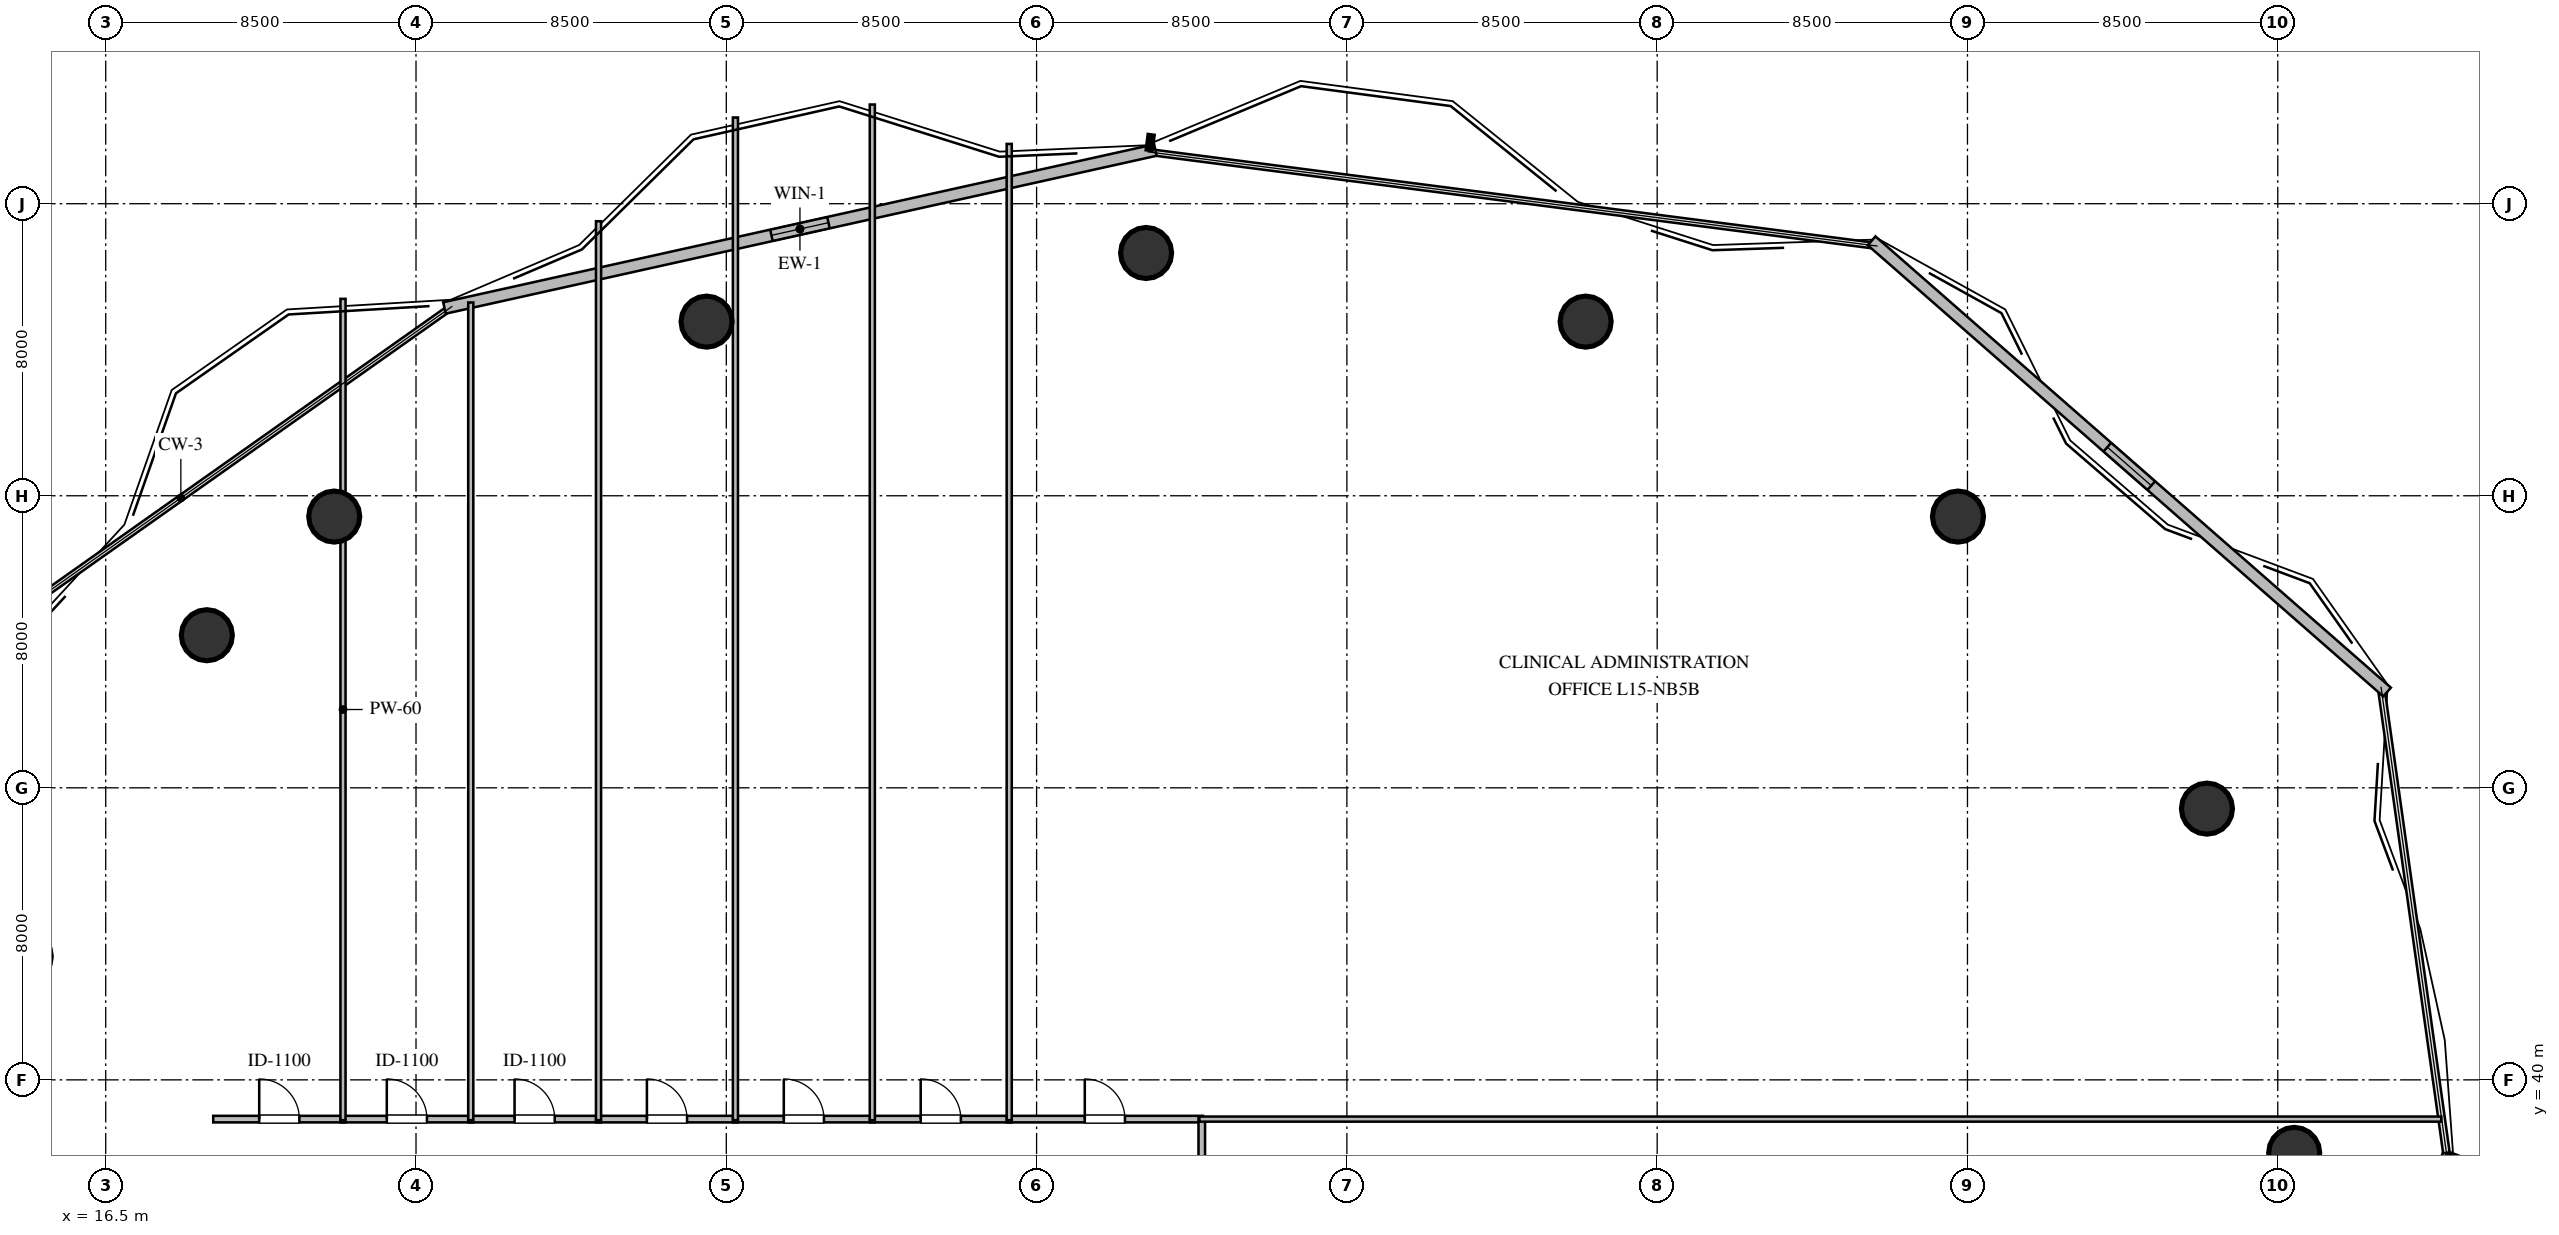
"""IFC4 building model, lengths in metres.
Left out: names, types, materials, properties, quantities, classifications, styles, units other than length and angle.
Written with IfcOpenShell. Run it as: python <this file> out.ifc"""

import sys

from ifc_helpers import new_model, si_unit, direction, frame, frame_2d, origin, origin_2d, place, context, subcontext, project, spatial, rectangle, circle, extrude, element, fill, save


model = new_model("IFC4")
c1 = context("Model", 3, precision=1e-05, world=origin(), true_north=direction((0.0, 1.0)))
c2 = subcontext(c1, "Body", "Model", "MODEL_VIEW")
j1 = project(units=[si_unit("LENGTHUNIT", "METRE"), si_unit("PLANEANGLEUNIT", "RADIAN")], contexts=[c1])
p1 = place(None, origin())
s1 = spatial("IfcSite", under=j1, at=p1, CompositionType="ELEMENT")
p2 = place(p1, origin())
s2 = spatial("IfcBuilding", under=s1, at=p2, CompositionType="ELEMENT")
p3 = place(p2, frame((0.0, 0.0, 60.0)))
s3 = spatial("IfcBuildingStorey", under=s2, at=p3, CompositionType="ELEMENT", Elevation=60.0)
for number, where, z_axis, x_axis in (
    (1, (76.45, 38.0, 0.0), (0.0, 0.0, 1.0), (1.0, 0.0, 0.0)),
    (2, (74.06, 47.43, 0.0), (0.0, 0.0, 1.0), (1.0, 0.0, 0.0)),
    (3, (67.24, 55.43, 0.0), (0.0, 0.0, 1.0), (1.0, 0.0, 0.0)),
    (4, (57.04, 60.77, 0.0), (0.0, 0.0, 1.0), (1.0, 0.0, 0.0)),
    (5, (45.0, 62.65, 0.0), (0.0, 0.0, 1.0), (1.0, 0.0, 0.0)),
    (6, (32.96, 60.77, 0.0), (0.0, 0.0, 1.0), (1.0, 0.0, 0.0)),
    (7, (22.76, 55.43, 0.0), (0.0, 0.0, 1.0), (1.0, 0.0, 0.0)),
    (8, (19.27, 52.18, 0.0), (0.0, 0.0, 1.0), (1.0, 0.0, 0.0)),
):
    element("IfcColumn", number, at=place(p3, frame(where, z_axis=z_axis, x_axis=x_axis)), inside=s3, PredefinedType="COLUMN", context=c2, shape_type="SweptSolid", body=[
        extrude(circle(Radius=0.7, at=origin_2d()), origin(), (0.0, 0.0, 1.0), 3.6),
    ])
p4 = place(p3, frame((25.78, 61.144, 0.0), z_axis=(0.0, 0.0, 1.0), x_axis=(0.976206349039, 0.216843639742, 0.0)))
e9 = element("IfcWall", 9, at=p4, inside=s3, PredefinedType="STANDARD", context=c2, shape_type="SweptSolid", body=[
    extrude(rectangle(XDim=19.949, YDim=0.32, at=frame_2d((9.975, 0.0))), origin(), (0.0, 0.0, 1.0), 3.36),
])
p5 = place(p4, frame((9.175, 0.0, 1.05)))
e10 = element("IfcOpeningElement", 10, at=p5, cuts=e9, PredefinedType="OPENING", context=c2, shape_type="SweptSolid", body=[
    extrude(rectangle(XDim=1.6, YDim=1.5, at=frame_2d((0.8, 0.75))), frame((0.0, 0.17, 0.0), z_axis=(0.0, -1.0, 0.0), x_axis=(1.0, 0.0, 0.0)), (0.0, 0.0, 1.0), 0.34),
])
p6 = place(p3, frame((64.874, 62.984, 0.0), z_axis=(0.0, 0.0, 1.0), x_axis=(0.752445311183, -0.658654730249, 0.0)))
e11 = element("IfcWall", 11, at=p6, inside=s3, PredefinedType="STANDARD", context=c2, shape_type="SweptSolid", body=[
    extrude(rectangle(XDim=18.765, YDim=0.32, at=frame_2d((9.383, 0.0))), origin(), (0.0, 0.0, 1.0), 3.36),
])
p7 = place(p6, frame((8.582, 0.0, 1.05)))
e12 = element("IfcOpeningElement", 12, at=p7, cuts=e11, PredefinedType="OPENING", context=c2, shape_type="SweptSolid", body=[
    extrude(rectangle(XDim=1.6, YDim=1.5, at=frame_2d((0.8, 0.75))), frame((0.0, 0.17, 0.0), z_axis=(0.0, -1.0, 0.0), x_axis=(1.0, 0.0, 0.0)), (0.0, 0.0, 1.0), 0.34),
])
p8 = place(p3, frame((19.445, 38.925, 0.0), z_axis=(0.0, 0.0, 1.0), x_axis=(1.0, 0.0, 0.0)))
e13 = element("IfcWall", 13, at=p8, inside=s3, PredefinedType="PARTITIONING", context=c2, shape_type="SweptSolid", body=[
    extrude(rectangle(XDim=3.62, YDim=0.18, at=frame_2d((1.81, 0.0))), origin(), (0.0, 0.0, 1.0), 3.36),
])
p9 = place(p8, frame((1.26, 0.0, 0.0)))
e14 = element("IfcOpeningElement", 14, at=p9, cuts=e13, PredefinedType="OPENING", context=c2, shape_type="SweptSolid", body=[
    extrude(rectangle(XDim=1.1, YDim=2.1, at=frame_2d((0.55, 1.05))), frame((0.0, 0.1, 0.0), z_axis=(0.0, -1.0, 0.0), x_axis=(1.0, 0.0, 0.0)), (0.0, 0.0, 1.0), 0.2),
])
p10 = place(p3, frame((22.935, 38.925, 0.0), z_axis=(0.0, 0.0, 1.0), x_axis=(1.0, 0.0, 0.0)))
e15 = element("IfcWall", 15, at=p10, inside=s3, PredefinedType="PARTITIONING", context=c2, shape_type="SweptSolid", body=[
    extrude(rectangle(XDim=3.63, YDim=0.18, at=frame_2d((1.815, 0.0))), origin(), (0.0, 0.0, 1.0), 3.36),
])
p11 = place(p10, frame((1.265, 0.0, 0.0)))
e16 = element("IfcOpeningElement", 16, at=p11, cuts=e15, PredefinedType="OPENING", context=c2, shape_type="SweptSolid", body=[
    extrude(rectangle(XDim=1.1, YDim=2.1, at=frame_2d((0.55, 1.05))), frame((0.0, 0.1, 0.0), z_axis=(0.0, -1.0, 0.0), x_axis=(1.0, 0.0, 0.0)), (0.0, 0.0, 1.0), 0.2),
])
p12 = place(p3, frame((26.435, 38.925, 0.0), z_axis=(0.0, 0.0, 1.0), x_axis=(1.0, 0.0, 0.0)))
e17 = element("IfcWall", 17, at=p12, inside=s3, PredefinedType="PARTITIONING", context=c2, shape_type="SweptSolid", body=[
    extrude(rectangle(XDim=3.63, YDim=0.18, at=frame_2d((1.815, 0.0))), origin(), (0.0, 0.0, 1.0), 3.36),
])
p13 = place(p12, frame((1.265, 0.0, 0.0)))
e18 = element("IfcOpeningElement", 18, at=p13, cuts=e17, PredefinedType="OPENING", context=c2, shape_type="SweptSolid", body=[
    extrude(rectangle(XDim=1.1, YDim=2.1, at=frame_2d((0.55, 1.05))), frame((0.0, 0.1, 0.0), z_axis=(0.0, -1.0, 0.0), x_axis=(1.0, 0.0, 0.0)), (0.0, 0.0, 1.0), 0.2),
])
p14 = place(p3, frame((29.935, 38.925, 0.0), z_axis=(0.0, 0.0, 1.0), x_axis=(1.0, 0.0, 0.0)))
e19 = element("IfcWall", 19, at=p14, inside=s3, PredefinedType="PARTITIONING", context=c2, shape_type="SweptSolid", body=[
    extrude(rectangle(XDim=3.88, YDim=0.18, at=frame_2d((1.94, 0.0))), origin(), (0.0, 0.0, 1.0), 3.36),
])
p15 = place(p14, frame((1.39, 0.0, 0.0)))
e20 = element("IfcOpeningElement", 20, at=p15, cuts=e19, PredefinedType="OPENING", context=c2, shape_type="SweptSolid", body=[
    extrude(rectangle(XDim=1.1, YDim=2.1, at=frame_2d((0.55, 1.05))), frame((0.0, 0.1, 0.0), z_axis=(0.0, -1.0, 0.0), x_axis=(1.0, 0.0, 0.0)), (0.0, 0.0, 1.0), 0.2),
])
p16 = place(p3, frame((33.685, 38.925, 0.0), z_axis=(0.0, 0.0, 1.0), x_axis=(1.0, 0.0, 0.0)))
e21 = element("IfcWall", 21, at=p16, inside=s3, PredefinedType="PARTITIONING", context=c2, shape_type="SweptSolid", body=[
    extrude(rectangle(XDim=3.88, YDim=0.18, at=frame_2d((1.94, 0.0))), origin(), (0.0, 0.0, 1.0), 3.36),
])
p17 = place(p16, frame((1.39, 0.0, 0.0)))
e22 = element("IfcOpeningElement", 22, at=p17, cuts=e21, PredefinedType="OPENING", context=c2, shape_type="SweptSolid", body=[
    extrude(rectangle(XDim=1.1, YDim=2.1, at=frame_2d((0.55, 1.05))), frame((0.0, 0.1, 0.0), z_axis=(0.0, -1.0, 0.0), x_axis=(1.0, 0.0, 0.0)), (0.0, 0.0, 1.0), 0.2),
])
p18 = place(p3, frame((37.435, 38.925, 0.0), z_axis=(0.0, 0.0, 1.0), x_axis=(1.0, 0.0, 0.0)))
e23 = element("IfcWall", 23, at=p18, inside=s3, PredefinedType="PARTITIONING", context=c2, shape_type="SweptSolid", body=[
    extrude(rectangle(XDim=3.88, YDim=0.18, at=frame_2d((1.94, 0.0))), origin(), (0.0, 0.0, 1.0), 3.36),
])
p19 = place(p18, frame((1.39, 0.0, 0.0)))
e24 = element("IfcOpeningElement", 24, at=p19, cuts=e23, PredefinedType="OPENING", context=c2, shape_type="SweptSolid", body=[
    extrude(rectangle(XDim=1.1, YDim=2.1, at=frame_2d((0.55, 1.05))), frame((0.0, 0.1, 0.0), z_axis=(0.0, -1.0, 0.0), x_axis=(1.0, 0.0, 0.0)), (0.0, 0.0, 1.0), 0.2),
])
p20 = place(p3, frame((41.185, 38.925, 0.0), z_axis=(0.0, 0.0, 1.0), x_axis=(1.0, 0.0, 0.0)))
e25 = element("IfcWall", 25, at=p20, inside=s3, PredefinedType="PARTITIONING", context=c2, shape_type="SweptSolid", body=[
    extrude(rectangle(XDim=5.37, YDim=0.18, at=frame_2d((2.685, 0.0))), origin(), (0.0, 0.0, 1.0), 3.36),
])
p21 = place(p20, frame((2.135, 0.0, 0.0)))
e26 = element("IfcOpeningElement", 26, at=p21, cuts=e25, PredefinedType="OPENING", context=c2, shape_type="SweptSolid", body=[
    extrude(rectangle(XDim=1.1, YDim=2.1, at=frame_2d((0.55, 1.05))), frame((0.0, 0.1, 0.0), z_axis=(0.0, -1.0, 0.0), x_axis=(1.0, 0.0, 0.0)), (0.0, 0.0, 1.0), 0.2),
])
p22 = place(p3, frame((46.525, 38.955, 0.0), z_axis=(0.0, 0.0, 1.0), x_axis=(0.0, -1.0, 0.0)))
e27 = element("IfcWall", 27, at=p22, inside=s3, PredefinedType="PARTITIONING", context=c2, shape_type="SweptSolid", body=[
    extrude(rectangle(XDim=5.56, YDim=0.18, at=frame_2d((2.78, 0.0))), origin(), (0.0, 0.0, 1.0), 3.36),
])
p23 = place(p22, frame((2.23, 0.0, 0.0)))
e28 = element("IfcOpeningElement", 28, at=p23, cuts=e27, PredefinedType="OPENING", context=c2, shape_type="SweptSolid", body=[
    extrude(rectangle(XDim=1.1, YDim=2.1, at=frame_2d((0.55, 1.05))), frame((0.0, 0.1, 0.0), z_axis=(0.0, -1.0, 0.0), x_axis=(1.0, 0.0, 0.0)), (0.0, 0.0, 1.0), 0.2),
])
p24 = place(p3, frame((23.0, 61.394, 0.0), z_axis=(0.0, 0.0, 1.0), x_axis=(0.0, -1.0, 0.0)))
e29 = element("IfcWall", 29, at=p24, inside=s3, PredefinedType="PARTITIONING", context=c2, shape_type="SweptSolid", body=[
    extrude(rectangle(XDim=22.499, YDim=0.14, at=frame_2d((11.25, 0.0))), origin(), (0.0, 0.0, 1.0), 2.89),
])
p25 = place(p3, frame((26.5, 61.294, 0.0), z_axis=(0.0, 0.0, 1.0), x_axis=(0.0, -1.0, 0.0)))
e30 = element("IfcWall", 30, at=p25, inside=s3, PredefinedType="PARTITIONING", context=c2, shape_type="SweptSolid", body=[
    extrude(rectangle(XDim=22.399, YDim=0.14, at=frame_2d((11.199, 0.0))), origin(), (0.0, 0.0, 1.0), 3.36),
])
p26 = place(p3, frame((30.0, 63.52, 0.0), z_axis=(0.0, 0.0, 1.0), x_axis=(0.0, -1.0, 0.0)))
e31 = element("IfcWall", 31, at=p26, inside=s3, PredefinedType="PARTITIONING", context=c2, shape_type="SweptSolid", body=[
    extrude(rectangle(XDim=24.625, YDim=0.14, at=frame_2d((12.312, 0.0))), origin(), (0.0, 0.0, 1.0), 2.89),
])
p27 = place(p3, frame((33.75, 66.362, 0.0), z_axis=(0.0, 0.0, 1.0), x_axis=(0.0, -1.0, 0.0)))
e32 = element("IfcWall", 32, at=p27, inside=s3, PredefinedType="PARTITIONING", context=c2, shape_type="SweptSolid", body=[
    extrude(rectangle(XDim=27.467, YDim=0.14, at=frame_2d((13.733, 0.0))), origin(), (0.0, 0.0, 1.0), 3.36),
])
p28 = place(p3, frame((37.5, 66.717, 0.0), z_axis=(0.0, 0.0, 1.0), x_axis=(0.0, -1.0, 0.0)))
e33 = element("IfcWall", 33, at=p28, inside=s3, PredefinedType="PARTITIONING", context=c2, shape_type="SweptSolid", body=[
    extrude(rectangle(XDim=27.822, YDim=0.14, at=frame_2d((13.911, 0.0))), origin(), (0.0, 0.0, 1.0), 3.36),
])
p29 = place(p3, frame((41.25, 65.638, 0.0), z_axis=(0.0, 0.0, 1.0), x_axis=(0.0, -1.0, 0.0)))
e34 = element("IfcWall", 34, at=p29, inside=s3, PredefinedType="PARTITIONING", context=c2, shape_type="SweptSolid", body=[
    extrude(rectangle(XDim=26.743, YDim=0.14, at=frame_2d((13.372, 0.0))), origin(), (0.0, 0.0, 1.0), 3.36),
])
p30 = place(p3, frame((80.48, 38.925, 0.0), z_axis=(0.0, 0.0, 1.0), x_axis=(-1.0, 0.0, 0.0)))
e35 = element("IfcWall", 35, at=p30, inside=s3, PredefinedType="PARTITIONING", context=c2, shape_type="SweptSolid", body=[
    extrude(rectangle(XDim=34.02, YDim=0.14, at=frame_2d((17.01, 0.0))), origin(), (0.0, 0.0, 1.0), 3.36),
])
p31 = place(p5, origin())
e36 = element("IfcWindow", 36, at=p31, inside=s3, PartitioningType="SINGLE_PANEL", PredefinedType="WINDOW", context=c2, shape_type="SweptSolid", body=[
    extrude(rectangle(XDim=1.6, YDim=1.5, at=frame_2d((0.8, 0.75))), frame((0.0, 0.03, 0.0), z_axis=(0.0, -1.0, 0.0), x_axis=(1.0, 0.0, 0.0)), (0.0, 0.0, 1.0), 0.06),
])
fill(e10, e36)
p32 = place(p7, origin())
e37 = element("IfcWindow", 37, at=p32, inside=s3, PartitioningType="SINGLE_PANEL", PredefinedType="WINDOW", context=c2, shape_type="SweptSolid", body=[
    extrude(rectangle(XDim=1.6, YDim=1.5, at=frame_2d((0.8, 0.75))), frame((0.0, 0.03, 0.0), z_axis=(0.0, -1.0, 0.0), x_axis=(1.0, 0.0, 0.0)), (0.0, 0.0, 1.0), 0.06),
])
fill(e12, e37)
p33 = place(p9, origin())
e38 = element("IfcDoor", 38, at=p33, inside=s3, OperationType="SINGLE_SWING_LEFT", PredefinedType="DOOR", context=c2, shape_type="SweptSolid", body=[
    extrude(rectangle(XDim=1.1, YDim=2.1, at=frame_2d((0.55, 1.05))), frame((0.0, 0.025, 0.0), z_axis=(0.0, -1.0, 0.0), x_axis=(1.0, 0.0, 0.0)), (0.0, 0.0, 1.0), 0.05),
])
fill(e14, e38)
p34 = place(p11, origin())
e39 = element("IfcDoor", 39, at=p34, inside=s3, OperationType="SINGLE_SWING_LEFT", PredefinedType="DOOR", context=c2, shape_type="SweptSolid", body=[
    extrude(rectangle(XDim=1.1, YDim=2.1, at=frame_2d((0.55, 1.05))), frame((0.0, 0.025, 0.0), z_axis=(0.0, -1.0, 0.0), x_axis=(1.0, 0.0, 0.0)), (0.0, 0.0, 1.0), 0.05),
])
fill(e16, e39)
p35 = place(p13, origin())
e40 = element("IfcDoor", 40, at=p35, inside=s3, OperationType="SINGLE_SWING_LEFT", PredefinedType="DOOR", context=c2, shape_type="SweptSolid", body=[
    extrude(rectangle(XDim=1.1, YDim=2.1, at=frame_2d((0.55, 1.05))), frame((0.0, 0.025, 0.0), z_axis=(0.0, -1.0, 0.0), x_axis=(1.0, 0.0, 0.0)), (0.0, 0.0, 1.0), 0.05),
])
fill(e18, e40)
p36 = place(p15, origin())
e41 = element("IfcDoor", 41, at=p36, inside=s3, OperationType="SINGLE_SWING_LEFT", PredefinedType="DOOR", context=c2, shape_type="SweptSolid", body=[
    extrude(rectangle(XDim=1.1, YDim=2.1, at=frame_2d((0.55, 1.05))), frame((0.0, 0.025, 0.0), z_axis=(0.0, -1.0, 0.0), x_axis=(1.0, 0.0, 0.0)), (0.0, 0.0, 1.0), 0.05),
])
fill(e20, e41)
p37 = place(p17, origin())
e42 = element("IfcDoor", 42, at=p37, inside=s3, OperationType="SINGLE_SWING_LEFT", PredefinedType="DOOR", context=c2, shape_type="SweptSolid", body=[
    extrude(rectangle(XDim=1.1, YDim=2.1, at=frame_2d((0.55, 1.05))), frame((0.0, 0.025, 0.0), z_axis=(0.0, -1.0, 0.0), x_axis=(1.0, 0.0, 0.0)), (0.0, 0.0, 1.0), 0.05),
])
fill(e22, e42)
p38 = place(p19, origin())
e43 = element("IfcDoor", 43, at=p38, inside=s3, OperationType="SINGLE_SWING_LEFT", PredefinedType="DOOR", context=c2, shape_type="SweptSolid", body=[
    extrude(rectangle(XDim=1.1, YDim=2.1, at=frame_2d((0.55, 1.05))), frame((0.0, 0.025, 0.0), z_axis=(0.0, -1.0, 0.0), x_axis=(1.0, 0.0, 0.0)), (0.0, 0.0, 1.0), 0.05),
])
fill(e24, e43)
p39 = place(p21, origin())
e44 = element("IfcDoor", 44, at=p39, inside=s3, OperationType="SINGLE_SWING_LEFT", PredefinedType="DOOR", context=c2, shape_type="SweptSolid", body=[
    extrude(rectangle(XDim=1.1, YDim=2.1, at=frame_2d((0.55, 1.05))), frame((0.0, 0.025, 0.0), z_axis=(0.0, -1.0, 0.0), x_axis=(1.0, 0.0, 0.0)), (0.0, 0.0, 1.0), 0.05),
])
fill(e26, e44)
save(model, sys.argv[1])
